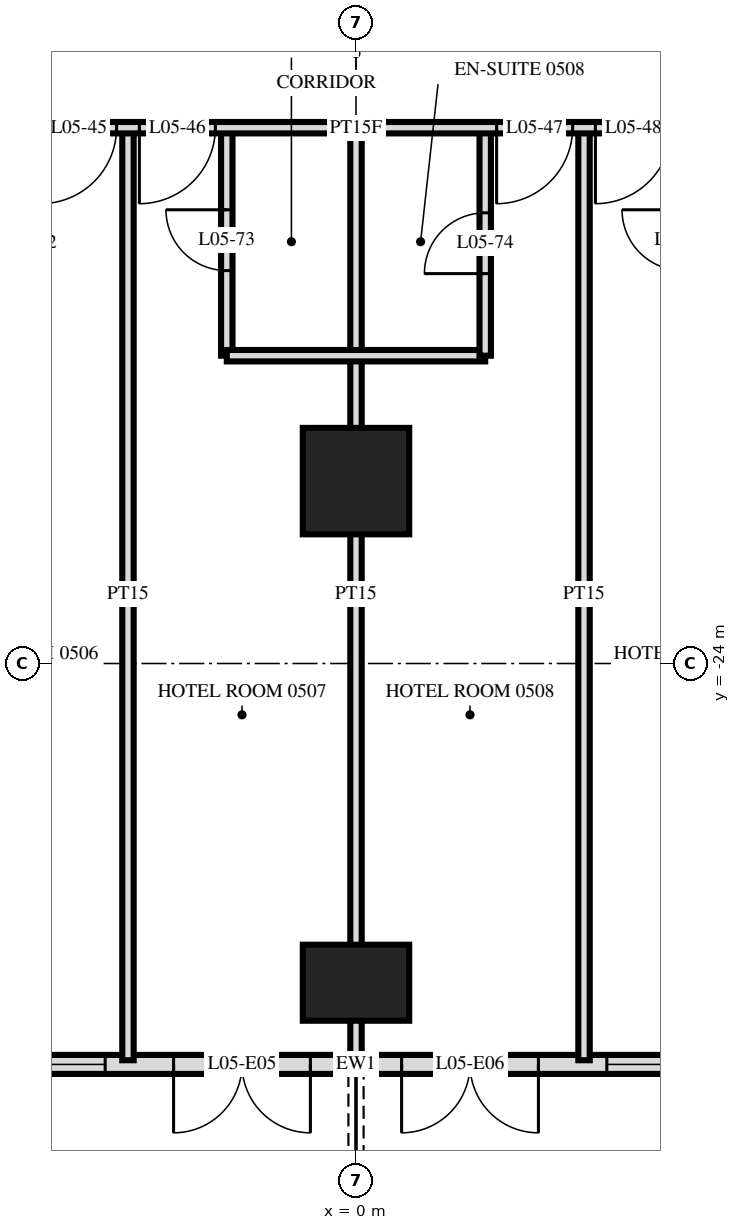
"""IFC4 building model, lengths in metres.
Left out: names, types, materials, properties, quantities, classifications, styles, units other than length and angle.
Written with IfcOpenShell. Run it as: python <this file> out.ifc"""

import sys

from ifc_helpers import new_model, si_unit, direction, frame, frame_2d, origin, origin_2d, place, context, subcontext, project, spatial, rectangle, extrude, element, fill, save


model = new_model("IFC4")
c1 = context("Model", 3, precision=1e-05, world=origin(), true_north=direction((0.0, 1.0)))
c2 = subcontext(c1, "Body", "Model", "MODEL_VIEW")
j1 = project(units=[si_unit("LENGTHUNIT", "METRE"), si_unit("PLANEANGLEUNIT", "RADIAN")], contexts=[c1])
p1 = place(None, origin())
s1 = spatial("IfcSite", under=j1, at=p1, CompositionType="ELEMENT")
p2 = place(p1, origin())
s2 = spatial("IfcBuilding", under=s1, at=p2, CompositionType="ELEMENT")
p3 = place(p2, frame((0.0, 0.0, 27.6)))
s3 = spatial("IfcBuildingStorey", under=s2, at=p3, CompositionType="ELEMENT", Elevation=27.6)
p4 = place(p3, frame((0.0, -28.2, 0.0), z_axis=(0.0, 0.0, 1.0), x_axis=(1.0, 0.0, 0.0)))
e1 = element("IfcColumn", 1, at=p4, inside=s3, PredefinedType="COLUMN", context=c2, shape_type="SweptSolid", body=[
    extrude(rectangle(XDim=1.4, YDim=1.0, at=origin_2d()), origin(), (0.0, 0.0, 1.0), 3.6),
])
p5 = place(p3, frame((0.0, -21.6, 0.0), z_axis=(0.0, 0.0, 1.0), x_axis=(1.0, 0.0, 0.0)))
e2 = element("IfcColumn", 2, at=p5, inside=s3, PredefinedType="COLUMN", context=c2, shape_type="SweptSolid", body=[
    extrude(rectangle(XDim=1.4, YDim=1.4, at=origin_2d()), origin(), (0.0, 0.0, 1.0), 3.6),
])
p6 = place(p3, frame((-28.775, -29.275, 0.0), z_axis=(0.0, 0.0, 1.0), x_axis=(1.0, 0.0, 0.0)))
e3 = element("IfcWall", 3, at=p6, inside=s3, PredefinedType="SOLIDWALL", context=c2, shape_type="SweptSolid", body=[
    extrude(rectangle(XDim=57.551, YDim=0.25, at=frame_2d((28.775, 0.0))), origin(), (0.0, 0.0, 1.0), 3.32),
])
p7 = place(p6, frame((0.575, 0.0, 0.0)))
e4 = element("IfcOpeningElement", 4, at=p7, cuts=e3, PredefinedType="OPENING", context=c2, shape_type="SweptSolid", body=[
    extrude(rectangle(XDim=1.8, YDim=2.4, at=frame_2d((0.9, 1.2))), frame((0.0, 0.135, 0.0), z_axis=(0.0, -1.0, 0.0), x_axis=(1.0, 0.0, 0.0)), (0.0, 0.0, 1.0), 0.27),
])
p8 = place(p6, frame((5.375, 0.0, 0.0)))
e5 = element("IfcOpeningElement", 5, at=p8, cuts=e3, PredefinedType="OPENING", context=c2, shape_type="SweptSolid", body=[
    extrude(rectangle(XDim=1.8, YDim=2.4, at=frame_2d((0.9, 1.2))), frame((0.0, 0.135, 0.0), z_axis=(0.0, -1.0, 0.0), x_axis=(1.0, 0.0, 0.0)), (0.0, 0.0, 1.0), 0.27),
])
p9 = place(p6, frame((8.075, 0.0, 0.3)))
e6 = element("IfcOpeningElement", 6, at=p9, cuts=e3, PredefinedType="OPENING", context=c2, shape_type="SweptSolid", body=[
    extrude(rectangle(XDim=2.4, YDim=2.1, at=frame_2d((1.2, 1.05))), frame((0.0, 0.135, 0.0), z_axis=(0.0, -1.0, 0.0), x_axis=(1.0, 0.0, 0.0)), (0.0, 0.0, 1.0), 0.27),
])
p10 = place(p6, frame((11.375, 0.0, 0.0)))
e7 = element("IfcOpeningElement", 7, at=p10, cuts=e3, PredefinedType="OPENING", context=c2, shape_type="SweptSolid", body=[
    extrude(rectangle(XDim=1.8, YDim=2.4, at=frame_2d((0.9, 1.2))), frame((0.0, 0.135, 0.0), z_axis=(0.0, -1.0, 0.0), x_axis=(1.0, 0.0, 0.0)), (0.0, 0.0, 1.0), 0.27),
])
p11 = place(p6, frame((14.075, 0.0, 0.3)))
e8 = element("IfcOpeningElement", 8, at=p11, cuts=e3, PredefinedType="OPENING", context=c2, shape_type="SweptSolid", body=[
    extrude(rectangle(XDim=2.4, YDim=2.1, at=frame_2d((1.2, 1.05))), frame((0.0, 0.135, 0.0), z_axis=(0.0, -1.0, 0.0), x_axis=(1.0, 0.0, 0.0)), (0.0, 0.0, 1.0), 0.27),
])
p12 = place(p6, frame((17.375, 0.0, 0.0)))
e9 = element("IfcOpeningElement", 9, at=p12, cuts=e3, PredefinedType="OPENING", context=c2, shape_type="SweptSolid", body=[
    extrude(rectangle(XDim=1.8, YDim=2.4, at=frame_2d((0.9, 1.2))), frame((0.0, 0.135, 0.0), z_axis=(0.0, -1.0, 0.0), x_axis=(1.0, 0.0, 0.0)), (0.0, 0.0, 1.0), 0.27),
])
p13 = place(p6, frame((20.075, 0.0, 0.3)))
e10 = element("IfcOpeningElement", 10, at=p13, cuts=e3, PredefinedType="OPENING", context=c2, shape_type="SweptSolid", body=[
    extrude(rectangle(XDim=2.4, YDim=2.1, at=frame_2d((1.2, 1.05))), frame((0.0, 0.135, 0.0), z_axis=(0.0, -1.0, 0.0), x_axis=(1.0, 0.0, 0.0)), (0.0, 0.0, 1.0), 0.27),
])
p14 = place(p6, frame((23.075, 0.0, 0.3)))
e11 = element("IfcOpeningElement", 11, at=p14, cuts=e3, PredefinedType="OPENING", context=c2, shape_type="SweptSolid", body=[
    extrude(rectangle(XDim=2.4, YDim=2.1, at=frame_2d((1.2, 1.05))), frame((0.0, 0.135, 0.0), z_axis=(0.0, -1.0, 0.0), x_axis=(1.0, 0.0, 0.0)), (0.0, 0.0, 1.0), 0.27),
])
p15 = place(p6, frame((26.375, 0.0, 0.0)))
e12 = element("IfcOpeningElement", 12, at=p15, cuts=e3, PredefinedType="OPENING", context=c2, shape_type="SweptSolid", body=[
    extrude(rectangle(XDim=1.8, YDim=2.4, at=frame_2d((0.9, 1.2))), frame((0.0, 0.135, 0.0), z_axis=(0.0, -1.0, 0.0), x_axis=(1.0, 0.0, 0.0)), (0.0, 0.0, 1.0), 0.27),
])
p16 = place(p6, frame((29.375, 0.0, 0.0)))
e13 = element("IfcOpeningElement", 13, at=p16, cuts=e3, PredefinedType="OPENING", context=c2, shape_type="SweptSolid", body=[
    extrude(rectangle(XDim=1.8, YDim=2.4, at=frame_2d((0.9, 1.2))), frame((0.0, 0.135, 0.0), z_axis=(0.0, -1.0, 0.0), x_axis=(1.0, 0.0, 0.0)), (0.0, 0.0, 1.0), 0.27),
])
p17 = place(p6, frame((32.075, 0.0, 0.3)))
e14 = element("IfcOpeningElement", 14, at=p17, cuts=e3, PredefinedType="OPENING", context=c2, shape_type="SweptSolid", body=[
    extrude(rectangle(XDim=2.4, YDim=2.1, at=frame_2d((1.2, 1.05))), frame((0.0, 0.135, 0.0), z_axis=(0.0, -1.0, 0.0), x_axis=(1.0, 0.0, 0.0)), (0.0, 0.0, 1.0), 0.27),
])
p18 = place(p6, frame((35.375, 0.0, 0.0)))
e15 = element("IfcOpeningElement", 15, at=p18, cuts=e3, PredefinedType="OPENING", context=c2, shape_type="SweptSolid", body=[
    extrude(rectangle(XDim=1.8, YDim=2.4, at=frame_2d((0.9, 1.2))), frame((0.0, 0.135, 0.0), z_axis=(0.0, -1.0, 0.0), x_axis=(1.0, 0.0, 0.0)), (0.0, 0.0, 1.0), 0.27),
])
p19 = place(p6, frame((38.075, 0.0, 0.3)))
e16 = element("IfcOpeningElement", 16, at=p19, cuts=e3, PredefinedType="OPENING", context=c2, shape_type="SweptSolid", body=[
    extrude(rectangle(XDim=2.4, YDim=2.1, at=frame_2d((1.2, 1.05))), frame((0.0, 0.135, 0.0), z_axis=(0.0, -1.0, 0.0), x_axis=(1.0, 0.0, 0.0)), (0.0, 0.0, 1.0), 0.27),
])
p20 = place(p6, frame((41.375, 0.0, 0.0)))
e17 = element("IfcOpeningElement", 17, at=p20, cuts=e3, PredefinedType="OPENING", context=c2, shape_type="SweptSolid", body=[
    extrude(rectangle(XDim=1.8, YDim=2.4, at=frame_2d((0.9, 1.2))), frame((0.0, 0.135, 0.0), z_axis=(0.0, -1.0, 0.0), x_axis=(1.0, 0.0, 0.0)), (0.0, 0.0, 1.0), 0.27),
])
p21 = place(p6, frame((44.075, 0.0, 0.3)))
e18 = element("IfcOpeningElement", 18, at=p21, cuts=e3, PredefinedType="OPENING", context=c2, shape_type="SweptSolid", body=[
    extrude(rectangle(XDim=2.4, YDim=2.1, at=frame_2d((1.2, 1.05))), frame((0.0, 0.135, 0.0), z_axis=(0.0, -1.0, 0.0), x_axis=(1.0, 0.0, 0.0)), (0.0, 0.0, 1.0), 0.27),
])
p22 = place(p6, frame((47.075, 0.0, 0.3)))
e19 = element("IfcOpeningElement", 19, at=p22, cuts=e3, PredefinedType="OPENING", context=c2, shape_type="SweptSolid", body=[
    extrude(rectangle(XDim=2.4, YDim=2.1, at=frame_2d((1.2, 1.05))), frame((0.0, 0.135, 0.0), z_axis=(0.0, -1.0, 0.0), x_axis=(1.0, 0.0, 0.0)), (0.0, 0.0, 1.0), 0.27),
])
p23 = place(p6, frame((50.375, 0.0, 0.0)))
e20 = element("IfcOpeningElement", 20, at=p23, cuts=e3, PredefinedType="OPENING", context=c2, shape_type="SweptSolid", body=[
    extrude(rectangle(XDim=1.8, YDim=2.4, at=frame_2d((0.9, 1.2))), frame((0.0, 0.135, 0.0), z_axis=(0.0, -1.0, 0.0), x_axis=(1.0, 0.0, 0.0)), (0.0, 0.0, 1.0), 0.27),
])
p24 = place(p6, frame((53.375, 0.0, 0.0)))
e21 = element("IfcOpeningElement", 21, at=p24, cuts=e3, PredefinedType="OPENING", context=c2, shape_type="SweptSolid", body=[
    extrude(rectangle(XDim=1.8, YDim=2.4, at=frame_2d((0.9, 1.2))), frame((0.0, 0.135, 0.0), z_axis=(0.0, -1.0, 0.0), x_axis=(1.0, 0.0, 0.0)), (0.0, 0.0, 1.0), 0.27),
])
p25 = place(p3, frame((3.0, -29.22, 0.0), z_axis=(0.0, 0.0, 1.0), x_axis=(0.0, 1.0, 0.0)))
e22 = element("IfcWall", 22, at=p25, inside=s3, PredefinedType="PARTITIONING", context=c2, shape_type="SweptSolid", body=[
    extrude(rectangle(XDim=12.27, YDim=0.15, at=frame_2d((6.135, 0.0))), origin(), (0.0, 0.0, 1.0), 3.32),
])
p26 = place(p3, frame((1.7, -19.95, 0.0), z_axis=(0.0, 0.0, 1.0), x_axis=(0.0, 1.0, 0.0)))
e23 = element("IfcWall", 23, at=p26, inside=s3, PredefinedType="PARTITIONING", context=c2, shape_type="SweptSolid", body=[
    extrude(rectangle(XDim=3.0, YDim=0.15, at=frame_2d((1.5, 0.0))), origin(), (0.0, 0.0, 1.0), 3.32),
])
p27 = place(p26, frame((1.08, 0.0, 0.0)))
e24 = element("IfcOpeningElement", 24, at=p27, cuts=e23, PredefinedType="OPENING", context=c2, shape_type="SweptSolid", body=[
    extrude(rectangle(XDim=0.8, YDim=2.1, at=frame_2d((0.4, 1.05))), frame((0.0, 0.085, 0.0), z_axis=(0.0, -1.0, 0.0), x_axis=(1.0, 0.0, 0.0)), (0.0, 0.0, 1.0), 0.17),
])
p28 = place(p3, frame((0.0, -29.22, 0.0), z_axis=(0.0, 0.0, 1.0), x_axis=(0.0, 1.0, 0.0)))
e25 = element("IfcWall", 25, at=p28, inside=s3, PredefinedType="PARTITIONING", context=c2, shape_type="SweptSolid", body=[
    extrude(rectangle(XDim=12.27, YDim=0.15, at=frame_2d((6.135, 0.0))), origin(), (0.0, 0.0, 1.0), 3.32),
])
p29 = place(p3, frame((-1.7, -19.95, 0.0), z_axis=(0.0, 0.0, 1.0), x_axis=(0.0, 1.0, 0.0)))
e26 = element("IfcWall", 26, at=p29, inside=s3, PredefinedType="PARTITIONING", context=c2, shape_type="SweptSolid", body=[
    extrude(rectangle(XDim=3.0, YDim=0.15, at=frame_2d((1.5, 0.0))), origin(), (0.0, 0.0, 1.0), 3.32),
])
p30 = place(p29, frame((1.12, 0.0, 0.0)))
e27 = element("IfcOpeningElement", 27, at=p30, cuts=e26, PredefinedType="OPENING", context=c2, shape_type="SweptSolid", body=[
    extrude(rectangle(XDim=0.8, YDim=2.1, at=frame_2d((0.4, 1.05))), frame((0.0, 0.085, 0.0), z_axis=(0.0, -1.0, 0.0), x_axis=(1.0, 0.0, 0.0)), (0.0, 0.0, 1.0), 0.17),
])
p31 = place(p3, frame((-3.0, -29.22, 0.0), z_axis=(0.0, 0.0, 1.0), x_axis=(0.0, 1.0, 0.0)))
e28 = element("IfcWall", 28, at=p31, inside=s3, PredefinedType="PARTITIONING", context=c2, shape_type="SweptSolid", body=[
    extrude(rectangle(XDim=12.27, YDim=0.15, at=frame_2d((6.135, 0.0))), origin(), (0.0, 0.0, 1.0), 3.32),
])
p32 = place(p3, frame((-1.7, -19.95, 0.0), z_axis=(0.0, 0.0, 1.0), x_axis=(1.0, 0.0, 0.0)))
e29 = element("IfcWall", 29, at=p32, inside=s3, PredefinedType="PARTITIONING", context=c2, shape_type="SweptSolid", body=[
    extrude(rectangle(XDim=3.4, YDim=0.15, at=frame_2d((1.7, 0.0))), origin(), (0.0, 0.0, 1.0), 3.32),
])
p33 = place(p3, frame((-33.12, -16.95, 0.0), z_axis=(0.0, 0.0, 1.0), x_axis=(1.0, 0.0, 0.0)))
e30 = element("IfcWall", 30, at=p33, inside=s3, PredefinedType="PARTITIONING", context=c2, shape_type="SweptSolid", body=[
    extrude(rectangle(XDim=66.24, YDim=0.15, at=frame_2d((33.12, 0.0))), origin(), (0.0, 0.0, 1.0), 3.32),
])
p34 = place(p33, frame((9.27, 0.0, 0.0)))
e31 = element("IfcOpeningElement", 31, at=p34, cuts=e30, PredefinedType="OPENING", context=c2, shape_type="SweptSolid", body=[
    extrude(rectangle(XDim=1.0, YDim=2.1, at=frame_2d((0.5, 1.05))), frame((0.0, 0.085, 0.0), z_axis=(0.0, -1.0, 0.0), x_axis=(1.0, 0.0, 0.0)), (0.0, 0.0, 1.0), 0.17),
])
p35 = place(p33, frame((13.97, 0.0, 0.0)))
e32 = element("IfcOpeningElement", 32, at=p35, cuts=e30, PredefinedType="OPENING", context=c2, shape_type="SweptSolid", body=[
    extrude(rectangle(XDim=1.0, YDim=2.1, at=frame_2d((0.5, 1.05))), frame((0.0, 0.085, 0.0), z_axis=(0.0, -1.0, 0.0), x_axis=(1.0, 0.0, 0.0)), (0.0, 0.0, 1.0), 0.17),
])
p36 = place(p33, frame((15.27, 0.0, 0.0)))
e33 = element("IfcOpeningElement", 33, at=p36, cuts=e30, PredefinedType="OPENING", context=c2, shape_type="SweptSolid", body=[
    extrude(rectangle(XDim=1.0, YDim=2.1, at=frame_2d((0.5, 1.05))), frame((0.0, 0.085, 0.0), z_axis=(0.0, -1.0, 0.0), x_axis=(1.0, 0.0, 0.0)), (0.0, 0.0, 1.0), 0.17),
])
p37 = place(p33, frame((19.97, 0.0, 0.0)))
e34 = element("IfcOpeningElement", 34, at=p37, cuts=e30, PredefinedType="OPENING", context=c2, shape_type="SweptSolid", body=[
    extrude(rectangle(XDim=1.0, YDim=2.1, at=frame_2d((0.5, 1.05))), frame((0.0, 0.085, 0.0), z_axis=(0.0, -1.0, 0.0), x_axis=(1.0, 0.0, 0.0)), (0.0, 0.0, 1.0), 0.17),
])
p38 = place(p33, frame((22.27, 0.0, 0.0)))
e35 = element("IfcOpeningElement", 35, at=p38, cuts=e30, PredefinedType="OPENING", context=c2, shape_type="SweptSolid", body=[
    extrude(rectangle(XDim=1.0, YDim=2.1, at=frame_2d((0.5, 1.05))), frame((0.0, 0.085, 0.0), z_axis=(0.0, -1.0, 0.0), x_axis=(1.0, 0.0, 0.0)), (0.0, 0.0, 1.0), 0.17),
])
p39 = place(p33, frame((28.97, 0.0, 0.0)))
e36 = element("IfcOpeningElement", 36, at=p39, cuts=e30, PredefinedType="OPENING", context=c2, shape_type="SweptSolid", body=[
    extrude(rectangle(XDim=1.0, YDim=2.1, at=frame_2d((0.5, 1.05))), frame((0.0, 0.085, 0.0), z_axis=(0.0, -1.0, 0.0), x_axis=(1.0, 0.0, 0.0)), (0.0, 0.0, 1.0), 0.17),
])
p40 = place(p33, frame((30.27, 0.0, 0.0)))
e37 = element("IfcOpeningElement", 37, at=p40, cuts=e30, PredefinedType="OPENING", context=c2, shape_type="SweptSolid", body=[
    extrude(rectangle(XDim=1.0, YDim=2.1, at=frame_2d((0.5, 1.05))), frame((0.0, 0.085, 0.0), z_axis=(0.0, -1.0, 0.0), x_axis=(1.0, 0.0, 0.0)), (0.0, 0.0, 1.0), 0.17),
])
p41 = place(p33, frame((34.97, 0.0, 0.0)))
e38 = element("IfcOpeningElement", 38, at=p41, cuts=e30, PredefinedType="OPENING", context=c2, shape_type="SweptSolid", body=[
    extrude(rectangle(XDim=1.0, YDim=2.1, at=frame_2d((0.5, 1.05))), frame((0.0, 0.085, 0.0), z_axis=(0.0, -1.0, 0.0), x_axis=(1.0, 0.0, 0.0)), (0.0, 0.0, 1.0), 0.17),
])
p42 = place(p33, frame((36.27, 0.0, 0.0)))
e39 = element("IfcOpeningElement", 39, at=p42, cuts=e30, PredefinedType="OPENING", context=c2, shape_type="SweptSolid", body=[
    extrude(rectangle(XDim=1.0, YDim=2.1, at=frame_2d((0.5, 1.05))), frame((0.0, 0.085, 0.0), z_axis=(0.0, -1.0, 0.0), x_axis=(1.0, 0.0, 0.0)), (0.0, 0.0, 1.0), 0.17),
])
p43 = place(p33, frame((40.97, 0.0, 0.0)))
e40 = element("IfcOpeningElement", 40, at=p43, cuts=e30, PredefinedType="OPENING", context=c2, shape_type="SweptSolid", body=[
    extrude(rectangle(XDim=1.0, YDim=2.1, at=frame_2d((0.5, 1.05))), frame((0.0, 0.085, 0.0), z_axis=(0.0, -1.0, 0.0), x_axis=(1.0, 0.0, 0.0)), (0.0, 0.0, 1.0), 0.17),
])
p44 = place(p33, frame((42.27, 0.0, 0.0)))
e41 = element("IfcOpeningElement", 41, at=p44, cuts=e30, PredefinedType="OPENING", context=c2, shape_type="SweptSolid", body=[
    extrude(rectangle(XDim=1.0, YDim=2.1, at=frame_2d((0.5, 1.05))), frame((0.0, 0.085, 0.0), z_axis=(0.0, -1.0, 0.0), x_axis=(1.0, 0.0, 0.0)), (0.0, 0.0, 1.0), 0.17),
])
p45 = place(p33, frame((46.97, 0.0, 0.0)))
e42 = element("IfcOpeningElement", 42, at=p45, cuts=e30, PredefinedType="OPENING", context=c2, shape_type="SweptSolid", body=[
    extrude(rectangle(XDim=1.0, YDim=2.1, at=frame_2d((0.5, 1.05))), frame((0.0, 0.085, 0.0), z_axis=(0.0, -1.0, 0.0), x_axis=(1.0, 0.0, 0.0)), (0.0, 0.0, 1.0), 0.17),
])
p46 = place(p33, frame((48.27, 0.0, 0.0)))
e43 = element("IfcOpeningElement", 43, at=p46, cuts=e30, PredefinedType="OPENING", context=c2, shape_type="SweptSolid", body=[
    extrude(rectangle(XDim=1.0, YDim=2.1, at=frame_2d((0.5, 1.05))), frame((0.0, 0.085, 0.0), z_axis=(0.0, -1.0, 0.0), x_axis=(1.0, 0.0, 0.0)), (0.0, 0.0, 1.0), 0.17),
])
p47 = place(p33, frame((52.97, 0.0, 0.0)))
e44 = element("IfcOpeningElement", 44, at=p47, cuts=e30, PredefinedType="OPENING", context=c2, shape_type="SweptSolid", body=[
    extrude(rectangle(XDim=1.0, YDim=2.1, at=frame_2d((0.5, 1.05))), frame((0.0, 0.085, 0.0), z_axis=(0.0, -1.0, 0.0), x_axis=(1.0, 0.0, 0.0)), (0.0, 0.0, 1.0), 0.17),
])
p48 = place(p33, frame((54.27, 0.0, 0.0)))
e45 = element("IfcOpeningElement", 45, at=p48, cuts=e30, PredefinedType="OPENING", context=c2, shape_type="SweptSolid", body=[
    extrude(rectangle(XDim=1.0, YDim=2.1, at=frame_2d((0.5, 1.05))), frame((0.0, 0.085, 0.0), z_axis=(0.0, -1.0, 0.0), x_axis=(1.0, 0.0, 0.0)), (0.0, 0.0, 1.0), 0.17),
])
p49 = place(p33, frame((4.4, 0.0, 0.0)))
e46 = element("IfcOpeningElement", 46, at=p49, cuts=e30, PredefinedType="OPENING", context=c2, shape_type="SweptSolid", body=[
    extrude(rectangle(XDim=1.0, YDim=2.1, at=frame_2d((0.5, 1.05))), frame((0.0, 0.085, 0.0), z_axis=(0.0, -1.0, 0.0), x_axis=(1.0, 0.0, 0.0)), (0.0, 0.0, 1.0), 0.17),
])
p50 = place(p33, frame((60.8, 0.0, 0.0)))
e47 = element("IfcOpeningElement", 47, at=p50, cuts=e30, PredefinedType="OPENING", context=c2, shape_type="SweptSolid", body=[
    extrude(rectangle(XDim=1.0, YDim=2.1, at=frame_2d((0.5, 1.05))), frame((0.0, 0.085, 0.0), z_axis=(0.0, -1.0, 0.0), x_axis=(1.0, 0.0, 0.0)), (0.0, 0.0, 1.0), 0.17),
])
p51 = place(p14, origin())
e48 = element("IfcWindow", 48, at=p51, inside=s3, PartitioningType="SINGLE_PANEL", PredefinedType="WINDOW", context=c2, shape_type="SweptSolid", body=[
    extrude(rectangle(XDim=2.4, YDim=2.1, at=frame_2d((1.2, 1.05))), frame((0.0, 0.03, 0.0), z_axis=(0.0, -1.0, 0.0), x_axis=(1.0, 0.0, 0.0)), (0.0, 0.0, 1.0), 0.06),
])
fill(e11, e48)
p52 = place(p15, frame((0.9, 0.0, 0.0), z_axis=(0.0, 0.0, 1.0), x_axis=(-1.0, 0.0, 0.0)))
e49 = element("IfcDoor", 49, at=p52, inside=s3, OperationType="DOUBLE_DOOR_SINGLE_SWING", PredefinedType="DOOR", context=c2, shape_type="SweptSolid", body=[
    extrude(rectangle(XDim=1.8, YDim=2.4, at=frame_2d((0.0, 1.2))), frame((0.0, -0.025, 0.0), z_axis=(0.0, 1.0, 0.0), x_axis=(-1.0, 0.0, 0.0)), (0.0, 0.0, 1.0), 0.05),
])
fill(e12, e49)
p53 = place(p16, frame((0.9, 0.0, 0.0), z_axis=(0.0, 0.0, 1.0), x_axis=(-1.0, 0.0, 0.0)))
e50 = element("IfcDoor", 50, at=p53, inside=s3, OperationType="DOUBLE_DOOR_SINGLE_SWING", PredefinedType="DOOR", context=c2, shape_type="SweptSolid", body=[
    extrude(rectangle(XDim=1.8, YDim=2.4, at=frame_2d((0.0, 1.2))), frame((0.0, -0.025, 0.0), z_axis=(0.0, 1.0, 0.0), x_axis=(-1.0, 0.0, 0.0)), (0.0, 0.0, 1.0), 0.05),
])
fill(e13, e50)
p54 = place(p17, origin())
e51 = element("IfcWindow", 51, at=p54, inside=s3, PartitioningType="SINGLE_PANEL", PredefinedType="WINDOW", context=c2, shape_type="SweptSolid", body=[
    extrude(rectangle(XDim=2.4, YDim=2.1, at=frame_2d((1.2, 1.05))), frame((0.0, 0.03, 0.0), z_axis=(0.0, -1.0, 0.0), x_axis=(1.0, 0.0, 0.0)), (0.0, 0.0, 1.0), 0.06),
])
fill(e14, e51)
p55 = place(p39, frame((0.5, 0.0, 0.0), z_axis=(0.0, 0.0, 1.0), x_axis=(-1.0, 0.0, 0.0)))
e52 = element("IfcDoor", 52, at=p55, inside=s3, OperationType="SINGLE_SWING_LEFT", PredefinedType="DOOR", context=c2, shape_type="SweptSolid", body=[
    extrude(rectangle(XDim=1.0, YDim=2.1, at=frame_2d((0.0, 1.05))), frame((0.0, -0.025, 0.0), z_axis=(0.0, 1.0, 0.0), x_axis=(-1.0, 0.0, 0.0)), (0.0, 0.0, 1.0), 0.05),
])
fill(e36, e52)
p56 = place(p40, frame((0.5, 0.0, 0.0), z_axis=(0.0, 0.0, 1.0), x_axis=(-1.0, 0.0, 0.0)))
e53 = element("IfcDoor", 53, at=p56, inside=s3, OperationType="SINGLE_SWING_LEFT", PredefinedType="DOOR", context=c2, shape_type="SweptSolid", body=[
    extrude(rectangle(XDim=1.0, YDim=2.1, at=frame_2d((0.0, 1.05))), frame((0.0, -0.025, 0.0), z_axis=(0.0, 1.0, 0.0), x_axis=(-1.0, 0.0, 0.0)), (0.0, 0.0, 1.0), 0.05),
])
fill(e37, e53)
p57 = place(p41, frame((0.5, 0.0, 0.0), z_axis=(0.0, 0.0, 1.0), x_axis=(-1.0, 0.0, 0.0)))
e54 = element("IfcDoor", 54, at=p57, inside=s3, OperationType="SINGLE_SWING_LEFT", PredefinedType="DOOR", context=c2, shape_type="SweptSolid", body=[
    extrude(rectangle(XDim=1.0, YDim=2.1, at=frame_2d((0.0, 1.05))), frame((0.0, -0.025, 0.0), z_axis=(0.0, 1.0, 0.0), x_axis=(-1.0, 0.0, 0.0)), (0.0, 0.0, 1.0), 0.05),
])
fill(e38, e54)
p58 = place(p42, frame((0.5, 0.0, 0.0), z_axis=(0.0, 0.0, 1.0), x_axis=(-1.0, 0.0, 0.0)))
e55 = element("IfcDoor", 55, at=p58, inside=s3, OperationType="SINGLE_SWING_LEFT", PredefinedType="DOOR", context=c2, shape_type="SweptSolid", body=[
    extrude(rectangle(XDim=1.0, YDim=2.1, at=frame_2d((0.0, 1.05))), frame((0.0, -0.025, 0.0), z_axis=(0.0, 1.0, 0.0), x_axis=(-1.0, 0.0, 0.0)), (0.0, 0.0, 1.0), 0.05),
])
fill(e39, e55)
p59 = place(p30, origin())
e56 = element("IfcDoor", 56, at=p59, inside=s3, OperationType="SINGLE_SWING_LEFT", PredefinedType="DOOR", context=c2, shape_type="SweptSolid", body=[
    extrude(rectangle(XDim=0.8, YDim=2.1, at=frame_2d((0.4, 1.05))), frame((0.0, 0.025, 0.0), z_axis=(0.0, -1.0, 0.0), x_axis=(1.0, 0.0, 0.0)), (0.0, 0.0, 1.0), 0.05),
])
fill(e27, e56)
p60 = place(p27, origin())
e57 = element("IfcDoor", 57, at=p60, inside=s3, OperationType="SINGLE_SWING_RIGHT", PredefinedType="DOOR", context=c2, shape_type="SweptSolid", body=[
    extrude(rectangle(XDim=0.8, YDim=2.1, at=frame_2d((0.4, 1.05))), frame((0.0, 0.025, 0.0), z_axis=(0.0, -1.0, 0.0), x_axis=(1.0, 0.0, 0.0)), (0.0, 0.0, 1.0), 0.05),
])
fill(e24, e57)
save(model, sys.argv[1])
